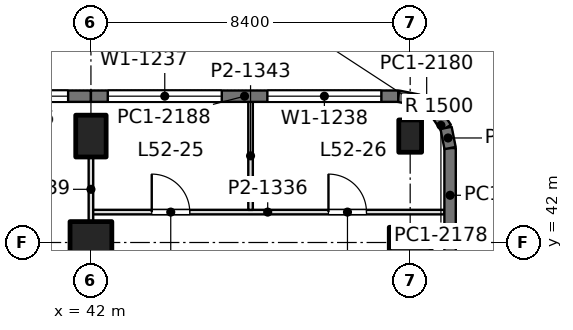
"""IFC4 building model, lengths in metres.
Left out: names, types, materials, properties, quantities, classifications, styles, units other than length and angle.
Written with IfcOpenShell. Run it as: python <this file> out.ifc"""

import sys

from ifc_helpers import new_model, si_unit, direction, frame, frame_2d, origin, origin_2d, place, context, subcontext, project, spatial, rectangle, extrude, element, fill, save


model = new_model("IFC4")
c1 = context("Model", 3, precision=1e-05, world=origin(), true_north=direction((0.0, 1.0)))
c2 = subcontext(c1, "Body", "Model", "MODEL_VIEW")
j1 = project(units=[si_unit("LENGTHUNIT", "METRE"), si_unit("PLANEANGLEUNIT", "RADIAN")], contexts=[c1])
p1 = place(None, origin())
s1 = spatial("IfcSite", under=j1, at=p1, CompositionType="ELEMENT")
p2 = place(p1, origin())
s2 = spatial("IfcBuilding", under=s1, at=p2, CompositionType="ELEMENT")
p3 = place(p2, frame((0.0, 0.0, 228.0)))
s3 = spatial("IfcBuildingStorey", under=s2, at=p3, CompositionType="ELEMENT", Elevation=228.0)
p4 = place(p3, frame((42.0, 42.0, 0.0), z_axis=(0.0, 0.0, 1.0), x_axis=(1.0, 0.0, 0.0)))
e1 = element("IfcColumn", 1, at=p4, inside=s3, PredefinedType="COLUMN", context=c2, shape_type="SweptSolid", body=[
    extrude(rectangle(XDim=1.1, YDim=1.1, at=origin_2d()), origin(), (0.0, 0.0, 1.0), 4.2),
])
for number, where, z_axis, x_axis in (
    (2, (42.0, 44.8, 0.0), (0.0, 0.0, 1.0), (1.0, 0.0, 0.0)),
    (3, (50.4, 42.0, 0.0), (0.0, 0.0, 1.0), (0.0, 1.0, 0.0)),
):
    element("IfcColumn", number, at=place(p3, frame(where, z_axis=z_axis, x_axis=x_axis)), inside=s3, PredefinedType="COLUMN", context=c2, shape_type="SweptSolid", body=[
        extrude(rectangle(XDim=0.8, YDim=1.1, at=origin_2d()), origin(), (0.0, 0.0, 1.0), 4.2),
    ])
p5 = place(p3, frame((50.4, 44.8, 0.0), z_axis=(0.0, 0.0, 1.0), x_axis=(1.0, 0.0, 0.0)))
e4 = element("IfcColumn", 4, at=p5, inside=s3, PredefinedType="COLUMN", context=c2, shape_type="SweptSolid", body=[
    extrude(rectangle(XDim=0.6, YDim=0.85, at=origin_2d()), origin(), (0.0, 0.0, 1.0), 4.2),
])
p6 = place(p3, frame((33.6, 45.85, 0.0), z_axis=(0.0, 0.0, 1.0), x_axis=(1.0, 0.0, 0.0)))
e5 = element("IfcWall", 5, at=p6, inside=s3, PredefinedType="SOLIDWALL", context=c2, shape_type="SweptSolid", body=[
    extrude(rectangle(XDim=8.4, YDim=0.3, at=frame_2d((4.2, 0.0))), origin(), (0.0, 0.0, 1.0), 4.05),
])
p7 = place(p6, frame((0.6, 0.0, 0.9)))
e6 = element("IfcOpeningElement", 6, at=p7, cuts=e5, PredefinedType="OPENING", context=c2, shape_type="SweptSolid", body=[
    extrude(rectangle(XDim=3.0, YDim=1.9, at=frame_2d((1.5, 0.95))), frame((0.0, 0.16, 0.0), z_axis=(0.0, -1.0, 0.0), x_axis=(1.0, 0.0, 0.0)), (0.0, 0.0, 1.0), 0.32),
])
p8 = place(p6, frame((4.8, 0.0, 0.9)))
e7 = element("IfcOpeningElement", 7, at=p8, cuts=e5, PredefinedType="OPENING", context=c2, shape_type="SweptSolid", body=[
    extrude(rectangle(XDim=3.0, YDim=1.9, at=frame_2d((1.5, 0.95))), frame((0.0, 0.16, 0.0), z_axis=(0.0, -1.0, 0.0), x_axis=(1.0, 0.0, 0.0)), (0.0, 0.0, 1.0), 0.32),
])
p9 = place(p3, frame((42.0, 45.85, 0.0), z_axis=(0.0, 0.0, 1.0), x_axis=(1.0, 0.0, 0.0)))
e8 = element("IfcWall", 8, at=p9, inside=s3, PredefinedType="SOLIDWALL", context=c2, shape_type="SweptSolid", body=[
    extrude(rectangle(XDim=8.085, YDim=0.3, at=frame_2d((4.042, 0.0))), origin(), (0.0, 0.0, 1.0), 4.05),
])
p10 = place(p9, frame((0.443, 0.0, 0.9)))
e9 = element("IfcOpeningElement", 9, at=p10, cuts=e8, PredefinedType="OPENING", context=c2, shape_type="SweptSolid", body=[
    extrude(rectangle(XDim=3.0, YDim=1.9, at=frame_2d((1.5, 0.95))), frame((0.0, 0.16, 0.0), z_axis=(0.0, -1.0, 0.0), x_axis=(1.0, 0.0, 0.0)), (0.0, 0.0, 1.0), 0.32),
])
p11 = place(p9, frame((4.643, 0.0, 0.9)))
e10 = element("IfcOpeningElement", 10, at=p11, cuts=e8, PredefinedType="OPENING", context=c2, shape_type="SweptSolid", body=[
    extrude(rectangle(XDim=3.0, YDim=1.9, at=frame_2d((1.5, 0.95))), frame((0.0, 0.16, 0.0), z_axis=(0.0, -1.0, 0.0), x_axis=(1.0, 0.0, 0.0)), (0.0, 0.0, 1.0), 0.32),
])
p12 = place(p3, frame((50.085, 45.85, 0.0), z_axis=(0.0, 0.0, 1.0), x_axis=(0.980702050465, -0.1955082817, 0.0)))
e11 = element("IfcWall", 11, at=p12, inside=s3, PredefinedType="SOLIDWALL", context=c2, shape_type="SweptSolid", body=[
    extrude(rectangle(XDim=0.541, YDim=0.3, at=frame_2d((0.271, 0.0))), origin(), (0.0, 0.0, 1.0), 4.05),
])
p13 = place(p3, frame((50.615, 45.744, 0.0), z_axis=(0.0, 0.0, 1.0), x_axis=(0.831692711774, -0.555236195849, 0.0)))
e12 = element("IfcWall", 12, at=p13, inside=s3, PredefinedType="SOLIDWALL", context=c2, shape_type="SweptSolid", body=[
    extrude(rectangle(XDim=0.525, YDim=0.3, at=frame_2d((0.263, 0.0))), origin(), (0.0, 0.0, 1.0), 4.05),
])
p14 = place(p3, frame((51.052, 45.453, 0.0), z_axis=(0.0, 0.0, 1.0), x_axis=(0.55534295404, -0.831621430339, 0.0)))
e13 = element("IfcWall", 13, at=p14, inside=s3, PredefinedType="SOLIDWALL", context=c2, shape_type="SweptSolid", body=[
    extrude(rectangle(XDim=0.526, YDim=0.3, at=frame_2d((0.263, 0.0))), origin(), (0.0, 0.0, 1.0), 4.05),
])
p15 = place(p3, frame((51.344, 45.015, 0.0), z_axis=(0.0, 0.0, 1.0), x_axis=(0.195073962632, -0.980788534345, 0.0)))
e14 = element("IfcWall", 14, at=p15, inside=s3, PredefinedType="SOLIDWALL", context=c2, shape_type="SweptSolid", body=[
    extrude(rectangle(XDim=0.541, YDim=0.3, at=frame_2d((0.271, 0.0))), origin(), (0.0, 0.0, 1.0), 4.05),
])
p16 = place(p3, frame((51.45, 44.485, 0.0), z_axis=(0.0, 0.0, 1.0), x_axis=(0.0, -1.0, 0.0)))
e15 = element("IfcWall", 15, at=p16, inside=s3, PredefinedType="SOLIDWALL", context=c2, shape_type="SweptSolid", body=[
    extrude(rectangle(XDim=2.485, YDim=0.3, at=frame_2d((1.243, 0.0))), origin(), (0.0, 0.0, 1.0), 4.05),
])
p17 = place(p3, frame((51.45, 42.0, 0.0), z_axis=(0.0, 0.0, 1.0), x_axis=(0.0, -1.0, 0.0)))
e16 = element("IfcWall", 16, at=p17, inside=s3, PredefinedType="SOLIDWALL", context=c2, shape_type="SweptSolid", body=[
    extrude(rectangle(XDim=4.275, YDim=0.3, at=frame_2d((2.137, 0.0))), origin(), (0.0, 0.0, 1.0), 4.05),
])
p18 = place(p17, frame((0.938, 0.0, 0.9)))
e17 = element("IfcOpeningElement", 17, at=p18, cuts=e16, PredefinedType="OPENING", context=c2, shape_type="SweptSolid", body=[
    extrude(rectangle(XDim=2.4, YDim=1.9, at=frame_2d((1.2, 0.95))), frame((0.0, 0.16, 0.0), z_axis=(0.0, -1.0, 0.0), x_axis=(1.0, 0.0, 0.0)), (0.0, 0.0, 1.0), 0.32),
])
p19 = place(p3, frame((42.0, 42.8, 0.0), z_axis=(0.0, 0.0, 1.0), x_axis=(1.0, 0.0, 0.0)))
e18 = element("IfcWall", 18, at=p19, inside=s3, PredefinedType="PARTITIONING", context=c2, shape_type="SweptSolid", body=[
    extrude(rectangle(XDim=9.302, YDim=0.12, at=frame_2d((4.651, 0.0))), origin(), (0.0, 0.0, 1.0), 3.56),
])
p20 = place(p19, frame((1.6, 0.0, 0.0)))
e19 = element("IfcOpeningElement", 19, at=p20, cuts=e18, PredefinedType="OPENING", context=c2, shape_type="SweptSolid", body=[
    extrude(rectangle(XDim=1.0, YDim=2.4, at=frame_2d((0.5, 1.2))), frame((0.0, 0.07, 0.0), z_axis=(0.0, -1.0, 0.0), x_axis=(1.0, 0.0, 0.0)), (0.0, 0.0, 1.0), 0.14),
])
p21 = place(p19, frame((6.25, 0.0, 0.0)))
e20 = element("IfcOpeningElement", 20, at=p21, cuts=e18, PredefinedType="OPENING", context=c2, shape_type="SweptSolid", body=[
    extrude(rectangle(XDim=1.0, YDim=2.4, at=frame_2d((0.5, 1.2))), frame((0.0, 0.07, 0.0), z_axis=(0.0, -1.0, 0.0), x_axis=(1.0, 0.0, 0.0)), (0.0, 0.0, 1.0), 0.14),
])
p22 = place(p3, frame((42.0, 42.548, 0.0), z_axis=(0.0, 0.0, 1.0), x_axis=(0.0, 1.0, 0.0)))
e21 = element("IfcWall", 21, at=p22, inside=s3, PredefinedType="PARTITIONING", context=c2, shape_type="SweptSolid", body=[
    extrude(rectangle(XDim=1.703, YDim=0.12, at=frame_2d((0.852, 0.0))), origin(), (0.0, 0.0, 1.0), 3.69),
])
p23 = place(p3, frame((46.2, 42.858, 0.0), z_axis=(0.0, 0.0, 1.0), x_axis=(0.0, 1.0, 0.0)))
e22 = element("IfcWall", 22, at=p23, inside=s3, PredefinedType="PARTITIONING", context=c2, shape_type="SweptSolid", body=[
    extrude(rectangle(XDim=2.844, YDim=0.12, at=frame_2d((1.422, 0.0))), origin(), (0.0, 0.0, 1.0), 3.56),
])
p24 = place(p8, origin())
e23 = element("IfcWindow", 23, at=p24, inside=s3, PartitioningType="SINGLE_PANEL", PredefinedType="WINDOW", context=c2, shape_type="SweptSolid", body=[
    extrude(rectangle(XDim=3.0, YDim=1.9, at=frame_2d((1.5, 0.95))), frame((0.0, 0.03, 0.0), z_axis=(0.0, -1.0, 0.0), x_axis=(1.0, 0.0, 0.0)), (0.0, 0.0, 1.0), 0.06),
])
fill(e7, e23)
p25 = place(p10, origin())
e24 = element("IfcWindow", 24, at=p25, inside=s3, PartitioningType="SINGLE_PANEL", PredefinedType="WINDOW", context=c2, shape_type="SweptSolid", body=[
    extrude(rectangle(XDim=3.0, YDim=1.9, at=frame_2d((1.5, 0.95))), frame((0.0, 0.03, 0.0), z_axis=(0.0, -1.0, 0.0), x_axis=(1.0, 0.0, 0.0)), (0.0, 0.0, 1.0), 0.06),
])
fill(e9, e24)
p26 = place(p11, origin())
e25 = element("IfcWindow", 25, at=p26, inside=s3, PartitioningType="SINGLE_PANEL", PredefinedType="WINDOW", context=c2, shape_type="SweptSolid", body=[
    extrude(rectangle(XDim=3.0, YDim=1.9, at=frame_2d((1.5, 0.95))), frame((0.0, 0.03, 0.0), z_axis=(0.0, -1.0, 0.0), x_axis=(1.0, 0.0, 0.0)), (0.0, 0.0, 1.0), 0.06),
])
fill(e10, e25)
p27 = place(p20, origin())
e26 = element("IfcDoor", 26, at=p27, inside=s3, OperationType="SINGLE_SWING_LEFT", PredefinedType="DOOR", context=c2, shape_type="SweptSolid", body=[
    extrude(rectangle(XDim=1.0, YDim=2.4, at=frame_2d((0.5, 1.2))), frame((0.0, 0.025, 0.0), z_axis=(0.0, -1.0, 0.0), x_axis=(1.0, 0.0, 0.0)), (0.0, 0.0, 1.0), 0.05),
])
fill(e19, e26)
p28 = place(p21, origin())
e27 = element("IfcDoor", 27, at=p28, inside=s3, OperationType="SINGLE_SWING_LEFT", PredefinedType="DOOR", context=c2, shape_type="SweptSolid", body=[
    extrude(rectangle(XDim=1.0, YDim=2.4, at=frame_2d((0.5, 1.2))), frame((0.0, 0.025, 0.0), z_axis=(0.0, -1.0, 0.0), x_axis=(1.0, 0.0, 0.0)), (0.0, 0.0, 1.0), 0.05),
])
fill(e20, e27)
save(model, sys.argv[1])
